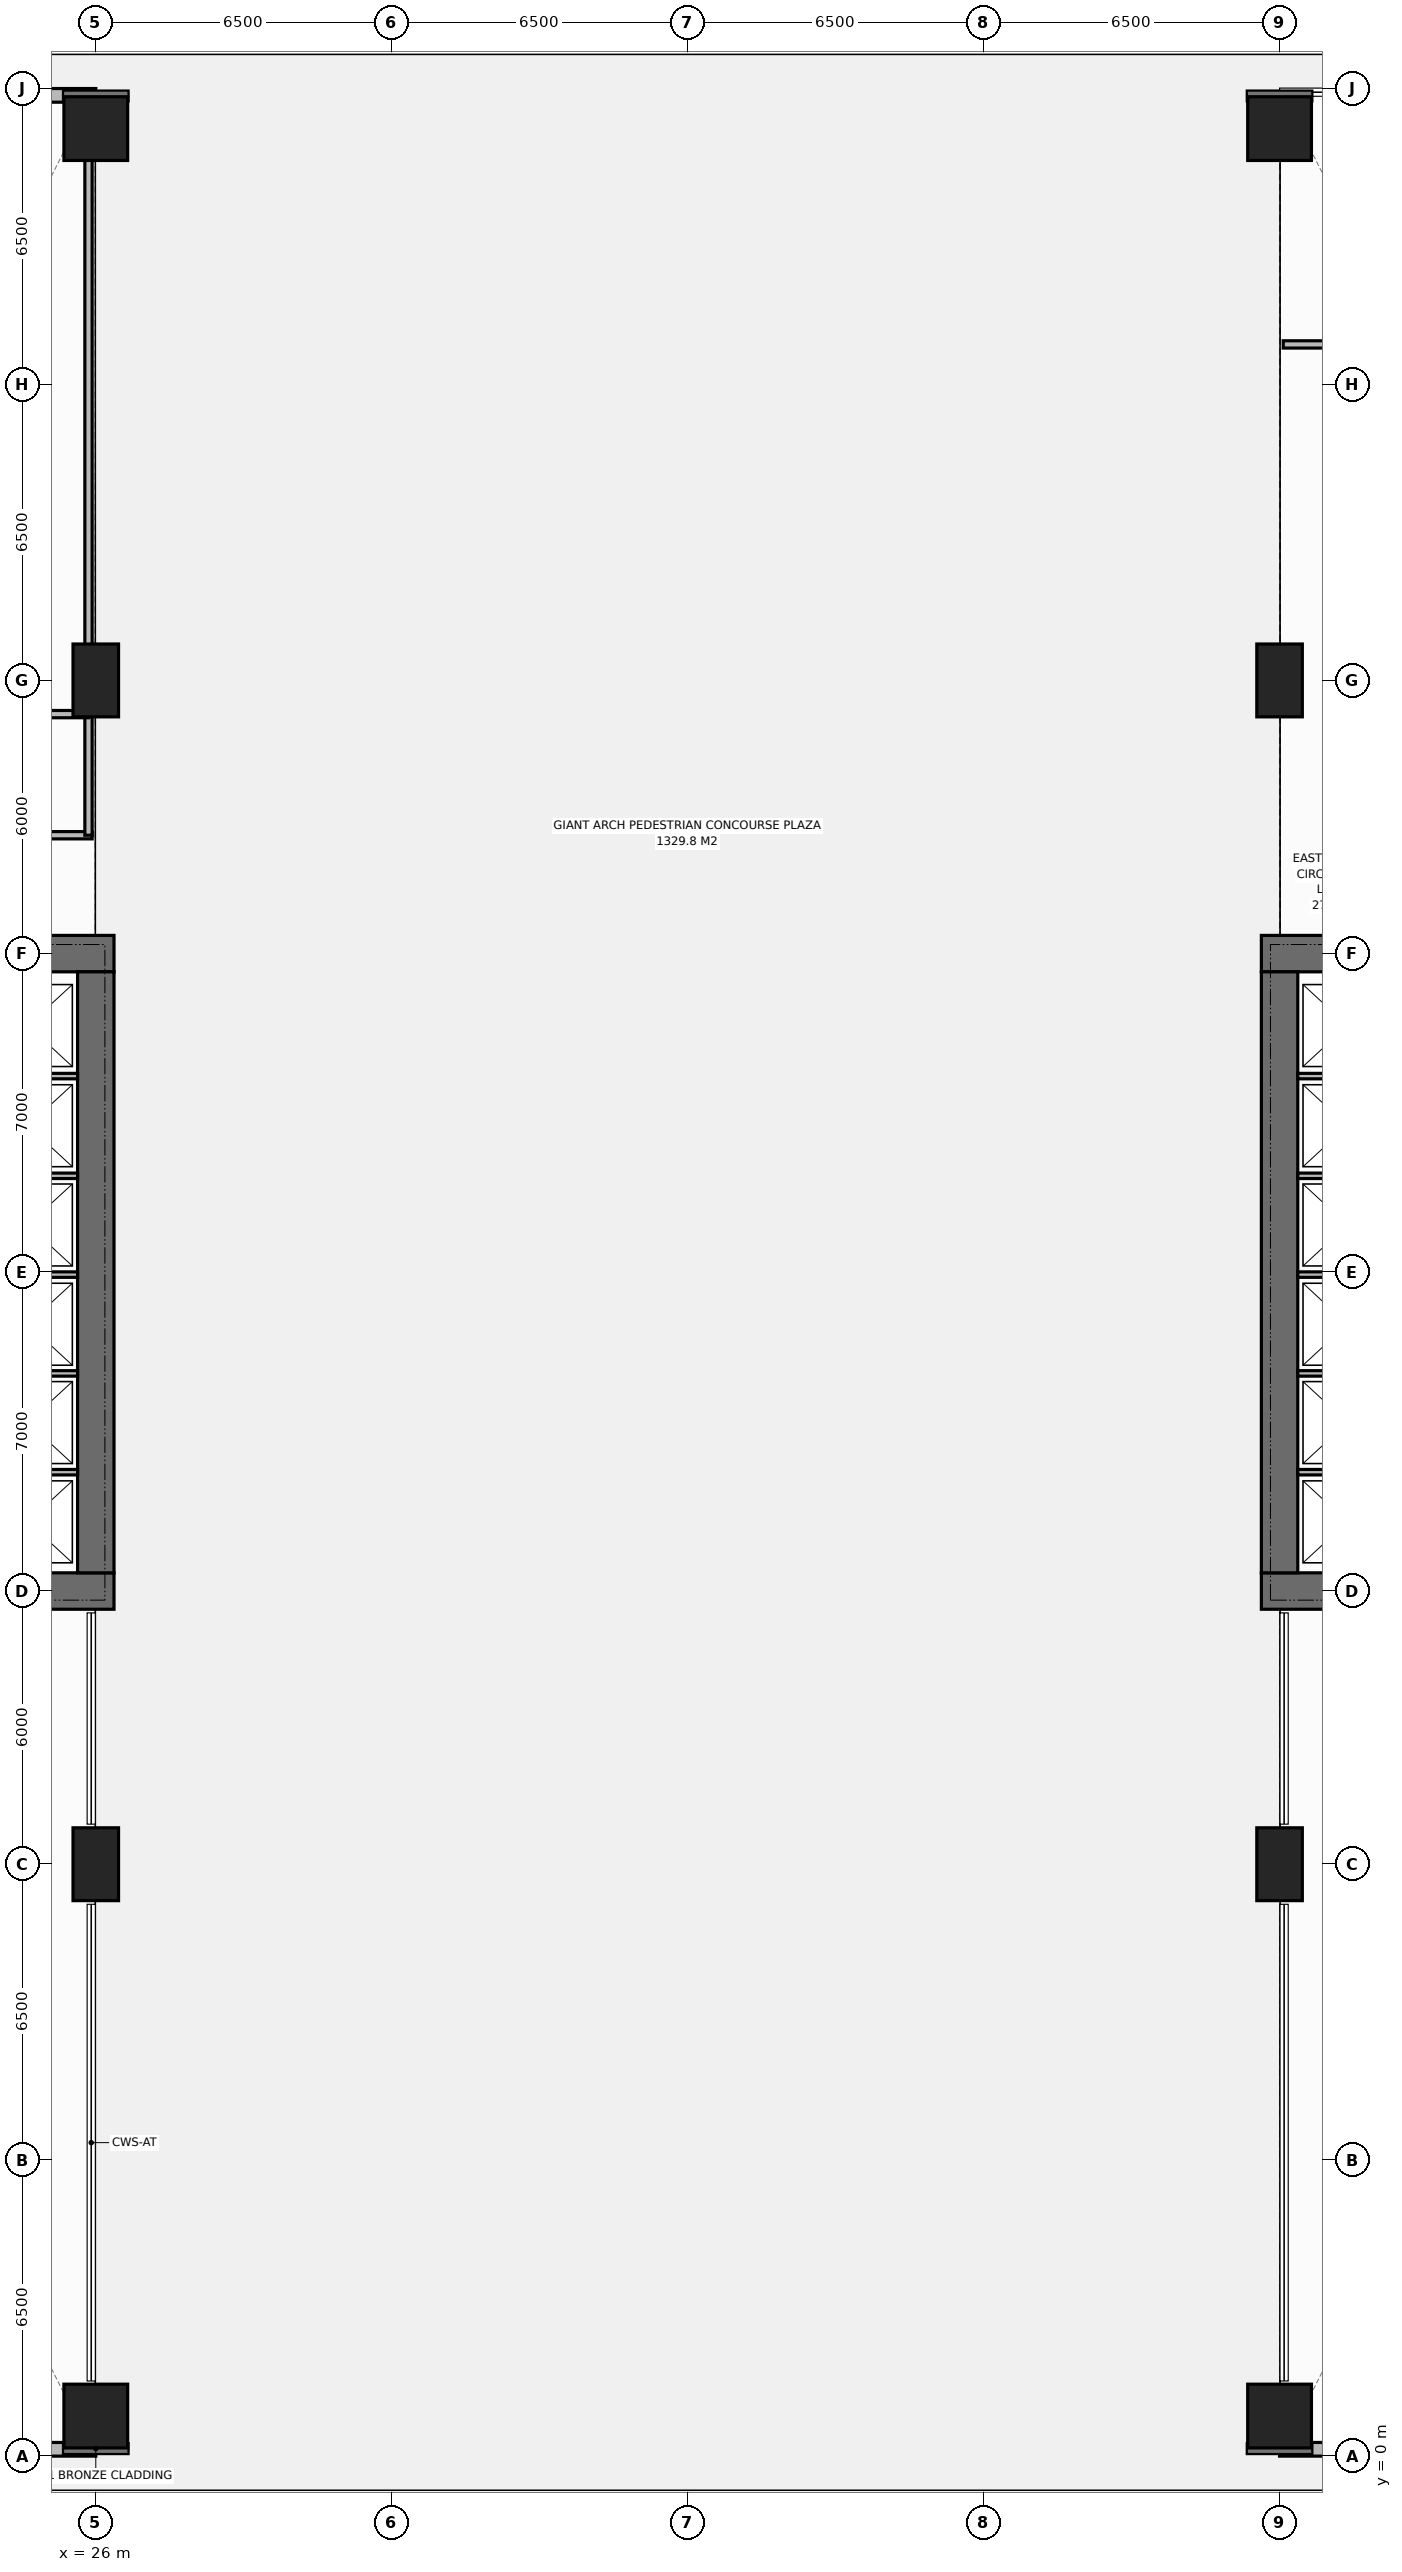
"""IFC4 building model, lengths in metres.
Left out: names, types, materials, properties, quantities, classifications, styles, units other than length and angle.
Written with IfcOpenShell. Run it as: python <this file> out.ifc"""

import sys

from ifc_helpers import new_model, si_unit, direction, frame, frame_2d, origin, origin_2d, place, context, subcontext, project, spatial, rectangle, extrude, element, save


model = new_model("IFC4")
c1 = context("Model", 3, precision=1e-05, world=origin(), true_north=direction((0.0, 1.0)))
c2 = subcontext(c1, "Body", "Model", "MODEL_VIEW")
j1 = project(units=[si_unit("LENGTHUNIT", "METRE"), si_unit("PLANEANGLEUNIT", "RADIAN")], contexts=[c1])
p1 = place(None, origin())
s1 = spatial("IfcSite", under=j1, at=p1, CompositionType="ELEMENT")
p2 = place(p1, origin())
s2 = spatial("IfcBuilding", under=s1, at=p2, CompositionType="ELEMENT")
p3 = place(p2, origin())
s3 = spatial("IfcBuildingStorey", under=s2, at=p3, CompositionType="ELEMENT", Elevation=0.0)
p4 = place(p3, frame((12.6, 19.0, 0.0), z_axis=(0.0, 0.0, 1.0), x_axis=(1.0, 0.0, 0.0)))
e1 = element("IfcWall", 1, at=p4, inside=s3, PredefinedType="SHEAR", context=c2, shape_type="SweptSolid", body=[
    extrude(rectangle(XDim=13.8, YDim=0.8, at=frame_2d((6.9, 0.0))), origin(), (0.0, 0.0, 1.0), 6.0),
])
p5 = place(p4, frame((9.28, 0.0, 0.0)))
e2 = element("IfcOpeningElement", 2, at=p5, cuts=e1, PredefinedType="OPENING", context=c2, shape_type="SweptSolid", body=[
    extrude(rectangle(XDim=1.4, YDim=2.2, at=frame_2d((0.7, 1.1))), frame((0.0, 0.41, 0.0), z_axis=(0.0, -1.0, 0.0), x_axis=(1.0, 0.0, 0.0)), (0.0, 0.0, 1.0), 0.82),
])
p6 = place(p3, frame((12.6, 33.0, 0.0), z_axis=(0.0, 0.0, 1.0), x_axis=(1.0, 0.0, 0.0)))
e3 = element("IfcWall", 3, at=p6, inside=s3, PredefinedType="SHEAR", context=c2, shape_type="SweptSolid", body=[
    extrude(rectangle(XDim=13.8, YDim=0.8, at=frame_2d((6.9, 0.0))), origin(), (0.0, 0.0, 1.0), 6.0),
])
p7 = place(p6, frame((1.3, 0.0, 0.0)))
e4 = element("IfcOpeningElement", 4, at=p7, cuts=e3, PredefinedType="OPENING", context=c2, shape_type="SweptSolid", body=[
    extrude(rectangle(XDim=0.9, YDim=2.15, at=frame_2d((0.45, 1.075))), frame((0.0, 0.41, 0.0), z_axis=(0.0, -1.0, 0.0), x_axis=(1.0, 0.0, 0.0)), (0.0, 0.0, 1.0), 0.82),
])
p8 = place(p6, frame((3.9, 0.0, 0.0)))
e5 = element("IfcOpeningElement", 5, at=p8, cuts=e3, PredefinedType="OPENING", context=c2, shape_type="SweptSolid", body=[
    extrude(rectangle(XDim=0.95, YDim=2.15, at=frame_2d((0.475, 1.075))), frame((0.0, 0.41, 0.0), z_axis=(0.0, -1.0, 0.0), x_axis=(1.0, 0.0, 0.0)), (0.0, 0.0, 1.0), 0.82),
])
p9 = place(p6, frame((6.9, 0.0, 0.0)))
e6 = element("IfcOpeningElement", 6, at=p9, cuts=e3, PredefinedType="OPENING", context=c2, shape_type="SweptSolid", body=[
    extrude(rectangle(XDim=0.95, YDim=2.15, at=frame_2d((0.475, 1.075))), frame((0.0, 0.41, 0.0), z_axis=(0.0, -1.0, 0.0), x_axis=(1.0, 0.0, 0.0)), (0.0, 0.0, 1.0), 0.82),
])
p10 = place(p6, frame((9.28, 0.0, 0.0)))
e7 = element("IfcOpeningElement", 7, at=p10, cuts=e3, PredefinedType="OPENING", context=c2, shape_type="SweptSolid", body=[
    extrude(rectangle(XDim=1.4, YDim=2.2, at=frame_2d((0.7, 1.1))), frame((0.0, 0.41, 0.0), z_axis=(0.0, -1.0, 0.0), x_axis=(1.0, 0.0, 0.0)), (0.0, 0.0, 1.0), 0.82),
])
p11 = place(p3, frame((26.0, 19.4, 0.0), z_axis=(0.0, 0.0, 1.0), x_axis=(0.0, 1.0, 0.0)))
e8 = element("IfcWall", 8, at=p11, inside=s3, PredefinedType="SHEAR", context=c2, shape_type="SweptSolid", body=[
    extrude(rectangle(XDim=13.2, YDim=0.8, at=frame_2d((6.6, 0.0))), origin(), (0.0, 0.0, 1.0), 6.0),
])
p12 = place(p3, frame((51.6, 19.0, 0.0), z_axis=(0.0, 0.0, 1.0), x_axis=(1.0, 0.0, 0.0)))
e9 = element("IfcWall", 9, at=p12, inside=s3, PredefinedType="SHEAR", context=c2, shape_type="SweptSolid", body=[
    extrude(rectangle(XDim=13.8, YDim=0.8, at=frame_2d((6.9, 0.0))), origin(), (0.0, 0.0, 1.0), 6.0),
])
p13 = place(p12, frame((3.12, 0.0, 0.0)))
e10 = element("IfcOpeningElement", 10, at=p13, cuts=e9, PredefinedType="OPENING", context=c2, shape_type="SweptSolid", body=[
    extrude(rectangle(XDim=1.4, YDim=2.2, at=frame_2d((0.7, 1.1))), frame((0.0, 0.41, 0.0), z_axis=(0.0, -1.0, 0.0), x_axis=(1.0, 0.0, 0.0)), (0.0, 0.0, 1.0), 0.82),
])
p14 = place(p3, frame((51.6, 33.0, 0.0), z_axis=(0.0, 0.0, 1.0), x_axis=(1.0, 0.0, 0.0)))
e11 = element("IfcWall", 11, at=p14, inside=s3, PredefinedType="SHEAR", context=c2, shape_type="SweptSolid", body=[
    extrude(rectangle(XDim=13.8, YDim=0.8, at=frame_2d((6.9, 0.0))), origin(), (0.0, 0.0, 1.0), 6.0),
])
p15 = place(p14, frame((3.12, 0.0, 0.0)))
e12 = element("IfcOpeningElement", 12, at=p15, cuts=e11, PredefinedType="OPENING", context=c2, shape_type="SweptSolid", body=[
    extrude(rectangle(XDim=1.4, YDim=2.2, at=frame_2d((0.7, 1.1))), frame((0.0, 0.41, 0.0), z_axis=(0.0, -1.0, 0.0), x_axis=(1.0, 0.0, 0.0)), (0.0, 0.0, 1.0), 0.82),
])
p16 = place(p14, frame((11.0, 0.0, 0.0)))
e13 = element("IfcOpeningElement", 13, at=p16, cuts=e11, PredefinedType="OPENING", context=c2, shape_type="SweptSolid", body=[
    extrude(rectangle(XDim=0.9, YDim=2.15, at=frame_2d((0.45, 1.075))), frame((0.0, 0.41, 0.0), z_axis=(0.0, -1.0, 0.0), x_axis=(1.0, 0.0, 0.0)), (0.0, 0.0, 1.0), 0.82),
])
p17 = place(p14, frame((6.4, 0.0, 0.0)))
e14 = element("IfcOpeningElement", 14, at=p17, cuts=e11, PredefinedType="OPENING", context=c2, shape_type="SweptSolid", body=[
    extrude(rectangle(XDim=0.95, YDim=2.15, at=frame_2d((0.475, 1.075))), frame((0.0, 0.41, 0.0), z_axis=(0.0, -1.0, 0.0), x_axis=(1.0, 0.0, 0.0)), (0.0, 0.0, 1.0), 0.82),
])
p18 = place(p14, frame((8.85, 0.0, 0.0)))
e15 = element("IfcOpeningElement", 15, at=p18, cuts=e11, PredefinedType="OPENING", context=c2, shape_type="SweptSolid", body=[
    extrude(rectangle(XDim=0.9, YDim=2.15, at=frame_2d((0.45, 1.075))), frame((0.0, 0.41, 0.0), z_axis=(0.0, -1.0, 0.0), x_axis=(1.0, 0.0, 0.0)), (0.0, 0.0, 1.0), 0.82),
])
p19 = place(p3, frame((52.0, 19.4, 0.0), z_axis=(0.0, 0.0, 1.0), x_axis=(0.0, 1.0, 0.0)))
e16 = element("IfcWall", 16, at=p19, inside=s3, PredefinedType="SHEAR", context=c2, shape_type="SweptSolid", body=[
    extrude(rectangle(XDim=13.2, YDim=0.8, at=frame_2d((6.6, 0.0))), origin(), (0.0, 0.0, 1.0), 6.0),
])
for number, where, z_axis, x_axis in (
    (17, (26.0, 13.0, 0.0), (0.0, 0.0, 1.0), (1.0, 0.0, 0.0)),
    (18, (26.0, 39.0, 0.0), (0.0, 0.0, 1.0), (1.0, 0.0, 0.0)),
    (19, (52.0, 13.0, 0.0), (0.0, 0.0, 1.0), (1.0, 0.0, 0.0)),
    (20, (52.0, 39.0, 0.0), (0.0, 0.0, 1.0), (1.0, 0.0, 0.0)),
):
    element("IfcColumn", number, at=place(p3, frame(where, z_axis=z_axis, x_axis=x_axis)), inside=s3, PredefinedType="PILASTER", context=c2, shape_type="SweptSolid", body=[
        extrude(rectangle(XDim=1.0, YDim=1.6, at=origin_2d()), origin(), (0.0, 0.0, 1.0), 6.0),
    ])
for number, where, z_axis, x_axis in (
    (21, (26.0, 0.88, 0.0), (0.0, 0.0, 1.0), (1.0, 0.0, 0.0)),
    (22, (26.0, 51.12, 0.0), (0.0, 0.0, 1.0), (1.0, 0.0, 0.0)),
    (23, (52.0, 0.88, 0.0), (0.0, 0.0, 1.0), (1.0, 0.0, 0.0)),
    (24, (52.0, 51.12, 0.0), (0.0, 0.0, 1.0), (1.0, 0.0, 0.0)),
):
    element("IfcColumn", number, at=place(p3, frame(where, z_axis=z_axis, x_axis=x_axis)), inside=s3, PredefinedType="COLUMN", context=c2, shape_type="SweptSolid", body=[
        extrude(rectangle(XDim=1.4, YDim=1.4, at=origin_2d()), origin(), (0.0, 0.0, 1.0), 6.0),
    ])
p20 = place(p3, frame((3.0, 51.85, 0.0), z_axis=(0.0, 0.0, 1.0), x_axis=(1.0, 0.0, 0.0)))
e25 = element("IfcWall", 25, at=p20, inside=s3, PredefinedType="STANDARD", context=c2, shape_type="SweptSolid", body=[
    extrude(rectangle(XDim=23.0, YDim=0.3, at=frame_2d((11.5, 0.0))), origin(), (0.0, 0.0, 1.0), 5.72),
])
p21 = place(p20, frame((6.8, 0.0, 0.0)))
e26 = element("IfcOpeningElement", 26, at=p21, cuts=e25, PredefinedType="OPENING", context=c2, shape_type="SweptSolid", body=[
    extrude(rectangle(XDim=2.2, YDim=2.4, at=frame_2d((1.1, 1.2))), frame((0.0, 0.16, 0.0), z_axis=(0.0, -1.0, 0.0), x_axis=(1.0, 0.0, 0.0)), (0.0, 0.0, 1.0), 0.32),
])
p22 = place(p3, frame((26.0, 0.15, 0.0), z_axis=(0.0, 0.0, 1.0), x_axis=(-1.0, 0.0, 0.0)))
e27 = element("IfcWall", 27, at=p22, inside=s3, PredefinedType="STANDARD", context=c2, shape_type="SweptSolid", body=[
    extrude(rectangle(XDim=23.0, YDim=0.3, at=frame_2d((11.5, 0.0))), origin(), (0.0, 0.0, 1.0), 5.72),
])
p23 = place(p22, frame((9.6, 0.0, 0.0)))
e28 = element("IfcOpeningElement", 28, at=p23, cuts=e27, PredefinedType="OPENING", context=c2, shape_type="SweptSolid", body=[
    extrude(rectangle(XDim=2.4, YDim=2.6, at=frame_2d((1.2, 1.3))), frame((0.0, 0.16, 0.0), z_axis=(0.0, -1.0, 0.0), x_axis=(1.0, 0.0, 0.0)), (0.0, 0.0, 1.0), 0.32),
])
p24 = place(p3, frame((75.0, 0.15, 0.0), z_axis=(0.0, 0.0, 1.0), x_axis=(-1.0, 0.0, 0.0)))
e29 = element("IfcWall", 29, at=p24, inside=s3, PredefinedType="STANDARD", context=c2, shape_type="SweptSolid", body=[
    extrude(rectangle(XDim=23.0, YDim=0.3, at=frame_2d((11.5, 0.0))), origin(), (0.0, 0.0, 1.0), 5.72),
])
p25 = place(p24, frame((12.0, 0.0, 0.0)))
e30 = element("IfcOpeningElement", 30, at=p25, cuts=e29, PredefinedType="OPENING", context=c2, shape_type="SweptSolid", body=[
    extrude(rectangle(XDim=2.2, YDim=2.4, at=frame_2d((1.1, 1.2))), frame((0.0, 0.16, 0.0), z_axis=(0.0, -1.0, 0.0), x_axis=(1.0, 0.0, 0.0)), (0.0, 0.0, 1.0), 0.32),
])
for number, where, z_axis, x_axis in (
    (31, (23.4, 21.61, 0.0), (0.0, 0.0, 1.0), (1.0, 0.0, 0.0)),
    (32, (23.4, 23.78, 0.0), (0.0, 0.0, 1.0), (1.0, 0.0, 0.0)),
    (33, (23.4, 25.95, 0.0), (0.0, 0.0, 1.0), (1.0, 0.0, 0.0)),
    (34, (23.4, 28.12, 0.0), (0.0, 0.0, 1.0), (1.0, 0.0, 0.0)),
    (35, (23.4, 30.31, 0.0), (0.0, 0.0, 1.0), (1.0, 0.0, 0.0)),
    (36, (52.4, 21.61, 0.0), (0.0, 0.0, 1.0), (1.0, 0.0, 0.0)),
    (37, (52.4, 23.78, 0.0), (0.0, 0.0, 1.0), (1.0, 0.0, 0.0)),
    (38, (52.4, 25.95, 0.0), (0.0, 0.0, 1.0), (1.0, 0.0, 0.0)),
    (39, (52.4, 28.12, 0.0), (0.0, 0.0, 1.0), (1.0, 0.0, 0.0)),
    (40, (52.4, 30.31, 0.0), (0.0, 0.0, 1.0), (1.0, 0.0, 0.0)),
):
    element("IfcWall", number, at=place(p3, frame(where, z_axis=z_axis, x_axis=x_axis)), inside=s3, PredefinedType="PARTITIONING", context=c2, shape_type="SweptSolid", body=[
        extrude(rectangle(XDim=2.2, YDim=0.12, at=frame_2d((1.1, 0.0))), origin(), (0.0, 0.0, 1.0), 5.72),
    ])
p26 = place(p3, frame((0.1, 35.6, 0.0), z_axis=(0.0, 0.0, 1.0), x_axis=(1.0, 0.0, 0.0)))
e41 = element("IfcWall", 41, at=p26, inside=s3, PredefinedType="STANDARD", context=c2, shape_type="SweptSolid", body=[
    extrude(rectangle(XDim=25.82, YDim=0.16, at=frame_2d((12.91, 0.0))), origin(), (0.0, 0.0, 1.0), 5.72),
])
p27 = place(p26, frame((10.5, 0.0, 0.0)))
e42 = element("IfcOpeningElement", 42, at=p27, cuts=e41, PredefinedType="OPENING", context=c2, shape_type="SweptSolid", body=[
    extrude(rectangle(XDim=1.5, YDim=2.2, at=frame_2d((0.75, 1.1))), frame((0.0, 0.09, 0.0), z_axis=(0.0, -1.0, 0.0), x_axis=(1.0, 0.0, 0.0)), (0.0, 0.0, 1.0), 0.18),
])
p28 = place(p26, frame((18.4, 0.0, 0.0)))
e43 = element("IfcOpeningElement", 43, at=p28, cuts=e41, PredefinedType="OPENING", context=c2, shape_type="SweptSolid", body=[
    extrude(rectangle(XDim=0.9, YDim=2.15, at=frame_2d((0.45, 1.075))), frame((0.0, 0.09, 0.0), z_axis=(0.0, -1.0, 0.0), x_axis=(1.0, 0.0, 0.0)), (0.0, 0.0, 1.0), 0.18),
])
p29 = place(p26, frame((21.35, 0.0, 0.0)))
e44 = element("IfcOpeningElement", 44, at=p29, cuts=e41, PredefinedType="OPENING", context=c2, shape_type="SweptSolid", body=[
    extrude(rectangle(XDim=0.9, YDim=2.15, at=frame_2d((0.45, 1.075))), frame((0.0, 0.09, 0.0), z_axis=(0.0, -1.0, 0.0), x_axis=(1.0, 0.0, 0.0)), (0.0, 0.0, 1.0), 0.18),
])
p30 = place(p26, frame((23.95, 0.0, 0.0)))
e45 = element("IfcOpeningElement", 45, at=p30, cuts=e41, PredefinedType="OPENING", context=c2, shape_type="SweptSolid", body=[
    extrude(rectangle(XDim=0.9, YDim=2.15, at=frame_2d((0.45, 1.075))), frame((0.0, 0.09, 0.0), z_axis=(0.0, -1.0, 0.0), x_axis=(1.0, 0.0, 0.0)), (0.0, 0.0, 1.0), 0.18),
])
p31 = place(p3, frame((25.84, 35.6, 0.0), z_axis=(0.0, 0.0, 1.0), x_axis=(0.0, 1.0, 0.0)))
e46 = element("IfcWall", 46, at=p31, inside=s3, PredefinedType="STANDARD", context=c2, shape_type="SweptSolid", body=[
    extrude(rectangle(XDim=16.25, YDim=0.16, at=frame_2d((8.125, 0.0))), origin(), (0.0, 0.0, 1.0), 4.92),
])
p32 = place(p3, frame((17.6, 38.26, 0.0), z_axis=(0.0, 0.0, 1.0), x_axis=(1.0, 0.0, 0.0)))
e47 = element("IfcWall", 47, at=p32, inside=s3, PredefinedType="STANDARD", context=c2, shape_type="SweptSolid", body=[
    extrude(rectangle(XDim=8.24, YDim=0.16, at=frame_2d((4.12, 0.0))), origin(), (0.0, 0.0, 1.0), 5.72),
])
p33 = place(p3, frame((52.08, 46.38, 0.0), z_axis=(0.0, 0.0, 1.0), x_axis=(1.0, 0.0, 0.0)))
e48 = element("IfcWall", 48, at=p33, inside=s3, PredefinedType="STANDARD", context=c2, shape_type="SweptSolid", body=[
    extrude(rectangle(XDim=3.5, YDim=0.16, at=frame_2d((1.75, 0.0))), origin(), (0.0, 0.0, 1.0), 5.72),
])
p34 = place(p33, frame((1.1, 0.0, 0.0)))
e49 = element("IfcOpeningElement", 49, at=p34, cuts=e48, PredefinedType="OPENING", context=c2, shape_type="SweptSolid", body=[
    extrude(rectangle(XDim=0.95, YDim=2.15, at=frame_2d((0.475, 1.075))), frame((0.0, 0.09, 0.0), z_axis=(0.0, -1.0, 0.0), x_axis=(1.0, 0.0, 0.0)), (0.0, 0.0, 1.0), 0.18),
])
save(model, sys.argv[1])
